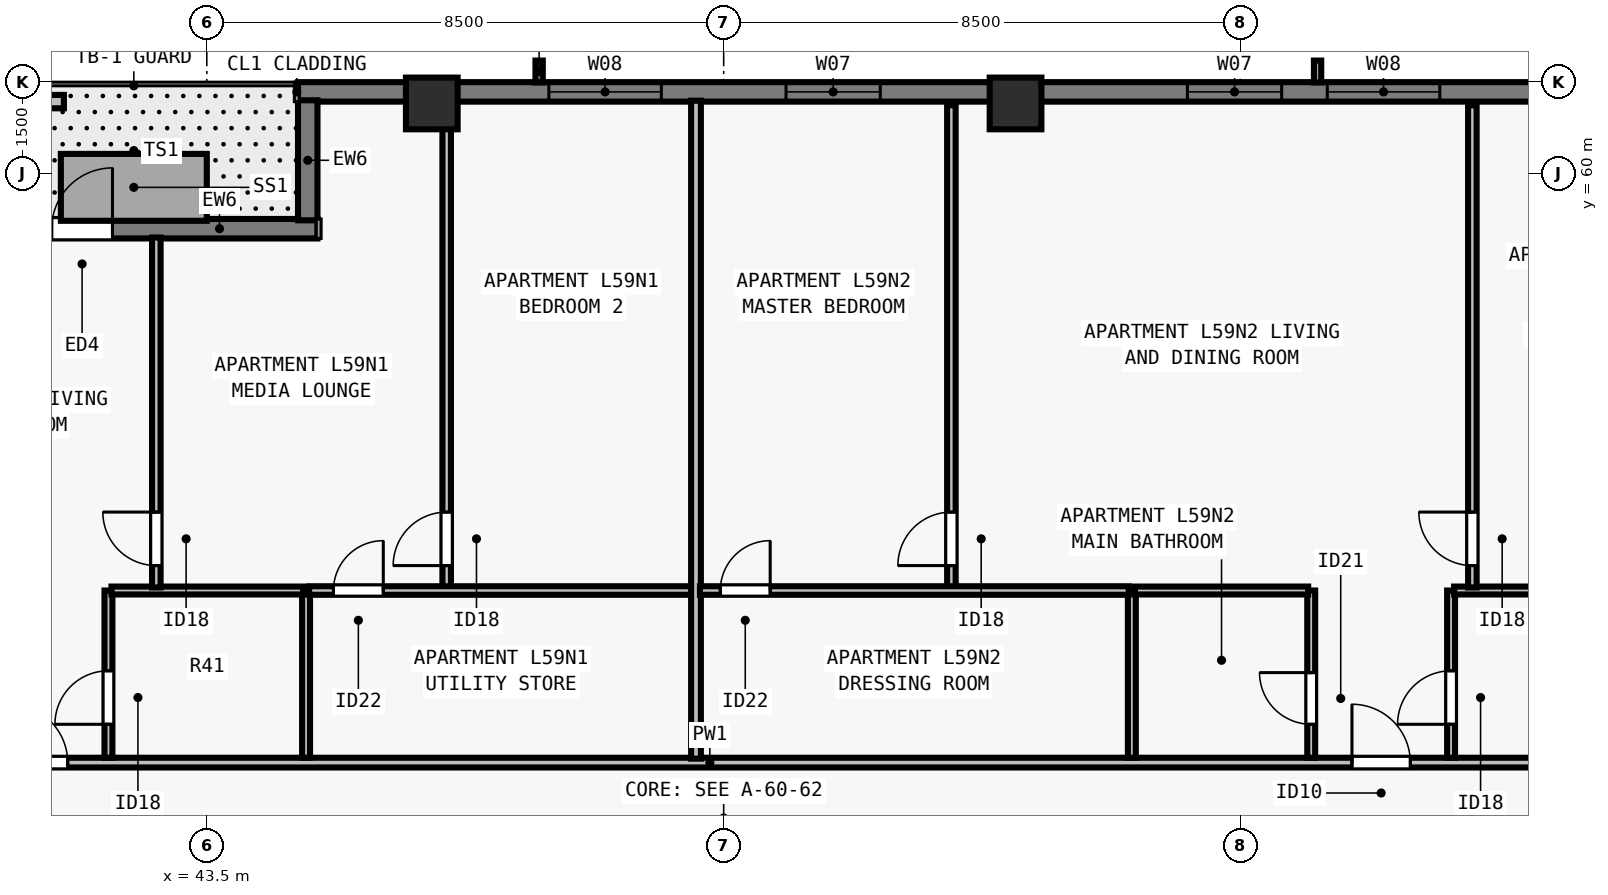
"""IFC4 building model, lengths in metres.
Left out: names, types, materials, properties, quantities, classifications, styles, units other than length and angle.
Written with IfcOpenShell. Run it as: python <this file> out.ifc"""

import sys

from ifc_helpers import new_model, si_unit, direction, frame, frame_2d, origin, origin_2d, place, context, subcontext, project, spatial, rectangle, extrude, element, fill, save


model = new_model("IFC4")
c1 = context("Model", 3, precision=1e-05, world=origin(), true_north=direction((0.0, 1.0)))
c2 = subcontext(c1, "Body", "Model", "MODEL_VIEW")
j1 = project(units=[si_unit("LENGTHUNIT", "METRE"), si_unit("PLANEANGLEUNIT", "RADIAN")], contexts=[c1])
p1 = place(None, origin())
s1 = spatial("IfcSite", under=j1, at=p1, CompositionType="ELEMENT")
p2 = place(p1, origin())
s2 = spatial("IfcBuilding", under=s1, at=p2, CompositionType="ELEMENT")
p3 = place(p2, frame((0.0, 0.0, 216.5)))
s3 = spatial("IfcBuildingStorey", under=s2, at=p3, CompositionType="ELEMENT", Elevation=216.5)
for number, where, z_axis, x_axis in (
    (1, (56.8, 61.15, 0.0), (0.0, 0.0, 1.0), (1.0, 0.0, 0.0)),
    (2, (47.2, 61.15, 0.0), (0.0, 0.0, 1.0), (1.0, 0.0, 0.0)),
):
    element("IfcColumn", number, at=place(p3, frame(where, z_axis=z_axis, x_axis=x_axis)), inside=s3, PredefinedType="COLUMN", context=c2, shape_type="SweptSolid", body=[
        extrude(rectangle(XDim=0.85, YDim=0.85, at=origin_2d()), origin(), (0.0, 0.0, 1.0), 3.5),
    ])
p4 = place(p3, frame((45.0, 61.34, 0.0), z_axis=(0.0, 0.0, 1.0), x_axis=(1.0, 0.0, 0.0)))
e3 = element("IfcWall", 3, at=p4, inside=s3, PredefinedType="SOLIDWALL", context=c2, shape_type="SweptSolid", body=[
    extrude(rectangle(XDim=24.202, YDim=0.32, at=frame_2d((12.101, 0.0))), origin(), (0.0, 0.0, 1.0), 3.29),
])
p5 = place(p4, frame((4.125, 0.0, 0.8)))
e4 = element("IfcOpeningElement", 4, at=p5, cuts=e3, PredefinedType="OPENING", context=c2, shape_type="SweptSolid", body=[
    extrude(rectangle(XDim=1.85, YDim=1.678, at=frame_2d((0.925, 0.839))), frame((0.0, 0.17, 0.0), z_axis=(0.0, -1.0, 0.0), x_axis=(1.0, 0.0, 0.0)), (0.0, 0.0, 1.0), 0.34),
])
p6 = place(p4, frame((8.026, 0.0, 0.8)))
e5 = element("IfcOpeningElement", 5, at=p6, cuts=e3, PredefinedType="OPENING", context=c2, shape_type="SweptSolid", body=[
    extrude(rectangle(XDim=1.55, YDim=1.678, at=frame_2d((0.775, 0.839))), frame((0.0, 0.17, 0.0), z_axis=(0.0, -1.0, 0.0), x_axis=(1.0, 0.0, 0.0)), (0.0, 0.0, 1.0), 0.34),
])
p7 = place(p4, frame((14.626, 0.0, 0.8)))
e6 = element("IfcOpeningElement", 6, at=p7, cuts=e3, PredefinedType="OPENING", context=c2, shape_type="SweptSolid", body=[
    extrude(rectangle(XDim=1.55, YDim=1.678, at=frame_2d((0.775, 0.839))), frame((0.0, 0.17, 0.0), z_axis=(0.0, -1.0, 0.0), x_axis=(1.0, 0.0, 0.0)), (0.0, 0.0, 1.0), 0.34),
])
p8 = place(p4, frame((16.927, 0.0, 0.8)))
e7 = element("IfcOpeningElement", 7, at=p8, cuts=e3, PredefinedType="OPENING", context=c2, shape_type="SweptSolid", body=[
    extrude(rectangle(XDim=1.85, YDim=1.678, at=frame_2d((0.925, 0.839))), frame((0.0, 0.17, 0.0), z_axis=(0.0, -1.0, 0.0), x_axis=(1.0, 0.0, 0.0)), (0.0, 0.0, 1.0), 0.34),
])
p9 = place(p3, frame((39.578, 59.09, 0.0), z_axis=(0.0, 0.0, 1.0), x_axis=(1.0, 0.0, 0.0)))
e8 = element("IfcWall", 8, at=p9, inside=s3, PredefinedType="SOLIDWALL", context=c2, shape_type="SweptSolid", body=[
    extrude(rectangle(XDim=5.742, YDim=0.32, at=frame_2d((2.871, 0.0))), origin(), (0.0, 0.0, 1.0), 3.29),
])
p10 = place(p9, frame((1.371, 0.0, 0.0)))
e9 = element("IfcOpeningElement", 9, at=p10, cuts=e8, PredefinedType="OPENING", context=c2, shape_type="SweptSolid", body=[
    extrude(rectangle(XDim=1.0, YDim=2.15, at=frame_2d((0.5, 1.075))), frame((0.0, 0.17, 0.0), z_axis=(0.0, -1.0, 0.0), x_axis=(1.0, 0.0, 0.0)), (0.0, 0.0, 1.0), 0.34),
])
p11 = place(p3, frame((45.16, 59.228, 0.0), z_axis=(0.0, 0.0, 1.0), x_axis=(0.0, 1.0, 0.0)))
e10 = element("IfcWall", 10, at=p11, inside=s3, PredefinedType="SOLIDWALL", context=c2, shape_type="SweptSolid", body=[
    extrude(rectangle(XDim=1.974, YDim=0.32, at=frame_2d((0.987, 0.0))), origin(), (0.0, 0.0, 1.0), 3.29),
])
p12 = place(p3, frame((39.85, 61.18, 0.0), z_axis=(0.0, 0.0, 1.0), x_axis=(1.0, 0.0, 0.0)))
e11 = element("IfcWall", 11, at=p12, inside=s3, PredefinedType="PARAPET", context=c2, shape_type="SweptSolid", body=[
    extrude(rectangle(XDim=1.3, YDim=0.22, at=frame_2d((0.65, 0.0))), origin(), (0.0, 0.0, 1.0), 0.55),
])
p13 = place(p3, frame((29.805, 50.31, 0.0), z_axis=(0.0, 0.0, 1.0), x_axis=(1.0, 0.0, 0.0)))
e12 = element("IfcWall", 12, at=p13, inside=s3, PredefinedType="PARTITIONING", context=c2, shape_type="SweptSolid", body=[
    extrude(rectangle(XDim=44.39, YDim=0.16, at=frame_2d((22.195, 0.0))), origin(), (0.0, 0.0, 1.0), 2.958),
])
p14 = place(p13, frame((10.448, 0.0, 0.0)))
e13 = element("IfcOpeningElement", 13, at=p14, cuts=e12, PredefinedType="OPENING", context=c2, shape_type="SweptSolid", body=[
    extrude(rectangle(XDim=0.96, YDim=2.18, at=frame_2d((0.48, 1.09))), frame((0.0, 0.09, 0.0), z_axis=(0.0, -1.0, 0.0), x_axis=(1.0, 0.0, 0.0)), (0.0, 0.0, 1.0), 0.18),
])
p15 = place(p13, frame((32.528, 0.0, 0.0)))
e14 = element("IfcOpeningElement", 14, at=p15, cuts=e12, PredefinedType="OPENING", context=c2, shape_type="SweptSolid", body=[
    extrude(rectangle(XDim=0.96, YDim=2.18, at=frame_2d((0.48, 1.09))), frame((0.0, 0.09, 0.0), z_axis=(0.0, -1.0, 0.0), x_axis=(1.0, 0.0, 0.0)), (0.0, 0.0, 1.0), 0.18),
])
p16 = place(p3, frame((45.133, 50.39, 0.0), z_axis=(0.0, 0.0, 1.0), x_axis=(0.0, 1.0, 0.0)))
e15 = element("IfcWall", 15, at=p16, inside=s3, PredefinedType="PLUMBINGWALL", context=c2, shape_type="SweptSolid", body=[
    extrude(rectangle(XDim=2.75, YDim=0.13, at=frame_2d((1.375, 0.0))), origin(), (0.0, 0.0, 1.0), 3.29),
])
p17 = place(p3, frame((41.883, 50.39, 0.0), z_axis=(0.0, 0.0, 1.0), x_axis=(0.0, 1.0, 0.0)))
e16 = element("IfcWall", 16, at=p17, inside=s3, PredefinedType="PLUMBINGWALL", context=c2, shape_type="SweptSolid", body=[
    extrude(rectangle(XDim=2.75, YDim=0.13, at=frame_2d((1.375, 0.0))), origin(), (0.0, 0.0, 1.0), 3.29),
])
p18 = place(p17, frame((0.55, 0.0, 0.0)))
e17 = element("IfcOpeningElement", 17, at=p18, cuts=e16, PredefinedType="OPENING", context=c2, shape_type="SweptSolid", body=[
    extrude(rectangle(XDim=0.88, YDim=2.1, at=frame_2d((0.44, 1.05))), frame((0.0, 0.075, 0.0), z_axis=(0.0, -1.0, 0.0), x_axis=(1.0, 0.0, 0.0)), (0.0, 0.0, 1.0), 0.15),
])
p19 = place(p3, frame((41.933, 53.14, 0.0), z_axis=(0.0, 0.0, 1.0), x_axis=(1.0, 0.0, 0.0)))
e18 = element("IfcWall", 18, at=p19, inside=s3, PredefinedType="PLUMBINGWALL", context=c2, shape_type="SweptSolid", body=[
    extrude(rectangle(XDim=3.15, YDim=0.13, at=frame_2d((1.575, 0.0))), origin(), (0.0, 0.0, 1.0), 3.29),
])
p20 = place(p3, frame((47.445, 53.1, 0.0), z_axis=(0.0, 0.0, 1.0), x_axis=(0.0, 1.0, 0.0)))
e19 = element("IfcWall", 19, at=p20, inside=s3, PredefinedType="PARTITIONING", context=c2, shape_type="SweptSolid", body=[
    extrude(rectangle(XDim=8.02, YDim=0.14, at=frame_2d((4.01, 0.0))), origin(), (0.0, 0.0, 1.0), 3.29),
])
p21 = place(p20, frame((0.45, 0.0, 0.0)))
e20 = element("IfcOpeningElement", 20, at=p21, cuts=e19, PredefinedType="OPENING", context=c2, shape_type="SweptSolid", body=[
    extrude(rectangle(XDim=0.88, YDim=2.1, at=frame_2d((0.44, 1.05))), frame((0.0, 0.08, 0.0), z_axis=(0.0, -1.0, 0.0), x_axis=(1.0, 0.0, 0.0)), (0.0, 0.0, 1.0), 0.16),
])
p22 = place(p3, frame((45.183, 53.14, 0.0), z_axis=(0.0, 0.0, 1.0), x_axis=(1.0, 0.0, 0.0)))
e21 = element("IfcWall", 21, at=p22, inside=s3, PredefinedType="PARTITIONING", context=c2, shape_type="SweptSolid", body=[
    extrude(rectangle(XDim=6.412, YDim=0.14, at=frame_2d((3.206, 0.0))), origin(), (0.0, 0.0, 1.0), 3.29),
])
p23 = place(p22, frame((0.4, 0.0, 0.0)))
e22 = element("IfcOpeningElement", 22, at=p23, cuts=e21, PredefinedType="OPENING", context=c2, shape_type="SweptSolid", body=[
    extrude(rectangle(XDim=0.82, YDim=2.1, at=frame_2d((0.41, 1.05))), frame((0.0, 0.08, 0.0), z_axis=(0.0, -1.0, 0.0), x_axis=(1.0, 0.0, 0.0)), (0.0, 0.0, 1.0), 0.16),
])
p24 = place(p3, frame((42.67, 53.19, 0.0), z_axis=(0.0, 0.0, 1.0), x_axis=(0.0, 1.0, 0.0)))
e23 = element("IfcWall", 23, at=p24, inside=s3, PredefinedType="PARTITIONING", context=c2, shape_type="SweptSolid", body=[
    extrude(rectangle(XDim=5.755, YDim=0.14, at=frame_2d((2.877, 0.0))), origin(), (0.0, 0.0, 1.0), 3.29),
])
p25 = place(p24, frame((0.36, 0.0, 0.0)))
e24 = element("IfcOpeningElement", 24, at=p25, cuts=e23, PredefinedType="OPENING", context=c2, shape_type="SweptSolid", body=[
    extrude(rectangle(XDim=0.88, YDim=2.1, at=frame_2d((0.44, 1.05))), frame((0.0, 0.08, 0.0), z_axis=(0.0, -1.0, 0.0), x_axis=(1.0, 0.0, 0.0)), (0.0, 0.0, 1.0), 0.16),
])
p26 = place(p3, frame((51.545, 50.375, 0.0), z_axis=(0.0, 0.0, 1.0), x_axis=(0.0, 1.0, 0.0)))
e25 = element("IfcWall", 25, at=p26, inside=s3, PredefinedType="PARTITIONING", context=c2, shape_type="SweptSolid", body=[
    extrude(rectangle(XDim=10.82, YDim=0.16, at=frame_2d((5.41, 0.0))), origin(), (0.0, 0.0, 1.0), 2.958),
])
p27 = place(p3, frame((58.712, 50.39, 0.0), z_axis=(0.0, 0.0, 1.0), x_axis=(0.0, 1.0, 0.0)))
e26 = element("IfcWall", 26, at=p27, inside=s3, PredefinedType="PLUMBINGWALL", context=c2, shape_type="SweptSolid", body=[
    extrude(rectangle(XDim=2.75, YDim=0.13, at=frame_2d((1.375, 0.0))), origin(), (0.0, 0.0, 1.0), 3.29),
])
p28 = place(p3, frame((61.663, 50.39, 0.0), z_axis=(0.0, 0.0, 1.0), x_axis=(0.0, 1.0, 0.0)))
e27 = element("IfcWall", 27, at=p28, inside=s3, PredefinedType="PLUMBINGWALL", context=c2, shape_type="SweptSolid", body=[
    extrude(rectangle(XDim=2.75, YDim=0.13, at=frame_2d((1.375, 0.0))), origin(), (0.0, 0.0, 1.0), 3.29),
])
p29 = place(p28, frame((0.55, 0.0, 0.0)))
e28 = element("IfcOpeningElement", 28, at=p29, cuts=e27, PredefinedType="OPENING", context=c2, shape_type="SweptSolid", body=[
    extrude(rectangle(XDim=0.85, YDim=2.08, at=frame_2d((0.425, 1.04))), frame((0.0, 0.075, 0.0), z_axis=(0.0, -1.0, 0.0), x_axis=(1.0, 0.0, 0.0)), (0.0, 0.0, 1.0), 0.15),
])
p30 = place(p3, frame((58.762, 53.14, 0.0), z_axis=(0.0, 0.0, 1.0), x_axis=(1.0, 0.0, 0.0)))
e29 = element("IfcWall", 29, at=p30, inside=s3, PredefinedType="PLUMBINGWALL", context=c2, shape_type="SweptSolid", body=[
    extrude(rectangle(XDim=2.85, YDim=0.13, at=frame_2d((1.425, 0.0))), origin(), (0.0, 0.0, 1.0), 3.29),
])
p31 = place(p3, frame((63.962, 50.39, 0.0), z_axis=(0.0, 0.0, 1.0), x_axis=(0.0, 1.0, 0.0)))
e30 = element("IfcWall", 30, at=p31, inside=s3, PredefinedType="PLUMBINGWALL", context=c2, shape_type="SweptSolid", body=[
    extrude(rectangle(XDim=2.75, YDim=0.13, at=frame_2d((1.375, 0.0))), origin(), (0.0, 0.0, 1.0), 2.573),
])
p32 = place(p31, frame((0.55, 0.0, 0.0)))
e31 = element("IfcOpeningElement", 31, at=p32, cuts=e30, PredefinedType="OPENING", context=c2, shape_type="SweptSolid", body=[
    extrude(rectangle(XDim=0.88, YDim=2.1, at=frame_2d((0.44, 1.05))), frame((0.0, 0.075, 0.0), z_axis=(0.0, -1.0, 0.0), x_axis=(1.0, 0.0, 0.0)), (0.0, 0.0, 1.0), 0.15),
])
p33 = place(p3, frame((64.012, 53.14, 0.0), z_axis=(0.0, 0.0, 1.0), x_axis=(1.0, 0.0, 0.0)))
e32 = element("IfcWall", 32, at=p33, inside=s3, PredefinedType="PLUMBINGWALL", context=c2, shape_type="SweptSolid", body=[
    extrude(rectangle(XDim=3.15, YDim=0.13, at=frame_2d((1.575, 0.0))), origin(), (0.0, 0.0, 1.0), 3.29),
])
p34 = place(p3, frame((55.745, 53.1, 0.0), z_axis=(0.0, 0.0, 1.0), x_axis=(0.0, 1.0, 0.0)))
e33 = element("IfcWall", 33, at=p34, inside=s3, PredefinedType="PARTITIONING", context=c2, shape_type="SweptSolid", body=[
    extrude(rectangle(XDim=8.02, YDim=0.14, at=frame_2d((4.01, 0.0))), origin(), (0.0, 0.0, 1.0), 2.958),
])
p35 = place(p34, frame((0.45, 0.0, 0.0)))
e34 = element("IfcOpeningElement", 34, at=p35, cuts=e33, PredefinedType="OPENING", context=c2, shape_type="SweptSolid", body=[
    extrude(rectangle(XDim=0.88, YDim=2.1, at=frame_2d((0.44, 1.05))), frame((0.0, 0.08, 0.0), z_axis=(0.0, -1.0, 0.0), x_axis=(1.0, 0.0, 0.0)), (0.0, 0.0, 1.0), 0.16),
])
p36 = place(p3, frame((51.61, 53.14, 0.0), z_axis=(0.0, 0.0, 1.0), x_axis=(1.0, 0.0, 0.0)))
e35 = element("IfcWall", 35, at=p36, inside=s3, PredefinedType="PARTITIONING", context=c2, shape_type="SweptSolid", body=[
    extrude(rectangle(XDim=7.052, YDim=0.14, at=frame_2d((3.526, 0.0))), origin(), (0.0, 0.0, 1.0), 3.29),
])
p37 = place(p36, frame((0.335, 0.0, 0.0)))
e36 = element("IfcOpeningElement", 36, at=p37, cuts=e35, PredefinedType="OPENING", context=c2, shape_type="SweptSolid", body=[
    extrude(rectangle(XDim=0.82, YDim=2.1, at=frame_2d((0.41, 1.05))), frame((0.0, 0.08, 0.0), z_axis=(0.0, -1.0, 0.0), x_axis=(1.0, 0.0, 0.0)), (0.0, 0.0, 1.0), 0.16),
])
p38 = place(p3, frame((64.312, 53.19, 0.0), z_axis=(0.0, 0.0, 1.0), x_axis=(0.0, 1.0, 0.0)))
e37 = element("IfcWall", 37, at=p38, inside=s3, PredefinedType="PARTITIONING", context=c2, shape_type="SweptSolid", body=[
    extrude(rectangle(XDim=7.93, YDim=0.14, at=frame_2d((3.965, 0.0))), origin(), (0.0, 0.0, 1.0), 2.573),
])
p39 = place(p38, frame((0.36, 0.0, 0.0)))
e38 = element("IfcOpeningElement", 38, at=p39, cuts=e37, PredefinedType="OPENING", context=c2, shape_type="SweptSolid", body=[
    extrude(rectangle(XDim=0.88, YDim=2.1, at=frame_2d((0.44, 1.05))), frame((0.0, 0.08, 0.0), z_axis=(0.0, -1.0, 0.0), x_axis=(1.0, 0.0, 0.0)), (0.0, 0.0, 1.0), 0.16),
])
p40 = place(p5, origin())
e39 = element("IfcWindow", 39, at=p40, inside=s3, PartitioningType="SINGLE_PANEL", PredefinedType="WINDOW", context=c2, shape_type="SweptSolid", body=[
    extrude(rectangle(XDim=1.85, YDim=1.678, at=frame_2d((0.925, 0.839))), frame((0.0, -0.05, 0.0), z_axis=(0.0, -1.0, 0.0), x_axis=(1.0, 0.0, 0.0)), (0.0, 0.0, 1.0), 0.06),
])
fill(e4, e39)
p41 = place(p6, origin())
e40 = element("IfcWindow", 40, at=p41, inside=s3, PartitioningType="SINGLE_PANEL", PredefinedType="WINDOW", context=c2, shape_type="SweptSolid", body=[
    extrude(rectangle(XDim=1.55, YDim=1.678, at=frame_2d((0.775, 0.839))), frame((0.0, -0.05, 0.0), z_axis=(0.0, -1.0, 0.0), x_axis=(1.0, 0.0, 0.0)), (0.0, 0.0, 1.0), 0.06),
])
fill(e5, e40)
p42 = place(p7, origin())
e41 = element("IfcWindow", 41, at=p42, inside=s3, PartitioningType="SINGLE_PANEL", PredefinedType="WINDOW", context=c2, shape_type="SweptSolid", body=[
    extrude(rectangle(XDim=1.55, YDim=1.678, at=frame_2d((0.775, 0.839))), frame((0.0, -0.05, 0.0), z_axis=(0.0, -1.0, 0.0), x_axis=(1.0, 0.0, 0.0)), (0.0, 0.0, 1.0), 0.06),
])
fill(e6, e41)
p43 = place(p8, origin())
e42 = element("IfcWindow", 42, at=p43, inside=s3, PartitioningType="SINGLE_PANEL", PredefinedType="WINDOW", context=c2, shape_type="SweptSolid", body=[
    extrude(rectangle(XDim=1.85, YDim=1.678, at=frame_2d((0.925, 0.839))), frame((0.0, -0.05, 0.0), z_axis=(0.0, -1.0, 0.0), x_axis=(1.0, 0.0, 0.0)), (0.0, 0.0, 1.0), 0.06),
])
fill(e7, e42)
p44 = place(p10, origin())
e43 = element("IfcDoor", 43, at=p44, inside=s3, OperationType="SINGLE_SWING_RIGHT", PredefinedType="DOOR", context=c2, shape_type="SweptSolid", body=[
    extrude(rectangle(XDim=1.0, YDim=2.15, at=frame_2d((0.5, 1.075))), frame((0.0, 0.025, 0.0), z_axis=(0.0, -1.0, 0.0), x_axis=(1.0, 0.0, 0.0)), (0.0, 0.0, 1.0), 0.05),
])
fill(e9, e43)
p45 = place(p18, origin())
e44 = element("IfcDoor", 44, at=p45, inside=s3, OperationType="SINGLE_SWING_LEFT", PredefinedType="DOOR", context=c2, shape_type="SweptSolid", body=[
    extrude(rectangle(XDim=0.88, YDim=2.1, at=frame_2d((0.44, 1.05))), frame((0.0, 0.025, 0.0), z_axis=(0.0, -1.0, 0.0), x_axis=(1.0, 0.0, 0.0)), (0.0, 0.0, 1.0), 0.05),
])
fill(e17, e44)
p46 = place(p23, origin())
e45 = element("IfcDoor", 45, at=p46, inside=s3, OperationType="SINGLE_SWING_RIGHT", PredefinedType="DOOR", context=c2, shape_type="SweptSolid", body=[
    extrude(rectangle(XDim=0.82, YDim=2.1, at=frame_2d((0.41, 1.05))), frame((0.0, 0.025, 0.0), z_axis=(0.0, -1.0, 0.0), x_axis=(1.0, 0.0, 0.0)), (0.0, 0.0, 1.0), 0.05),
])
fill(e22, e45)
p47 = place(p21, origin())
e46 = element("IfcDoor", 46, at=p47, inside=s3, OperationType="SINGLE_SWING_LEFT", PredefinedType="DOOR", context=c2, shape_type="SweptSolid", body=[
    extrude(rectangle(XDim=0.88, YDim=2.1, at=frame_2d((0.44, 1.05))), frame((0.0, 0.025, 0.0), z_axis=(0.0, -1.0, 0.0), x_axis=(1.0, 0.0, 0.0)), (0.0, 0.0, 1.0), 0.05),
])
fill(e20, e46)
p48 = place(p25, origin())
e47 = element("IfcDoor", 47, at=p48, inside=s3, OperationType="SINGLE_SWING_RIGHT", PredefinedType="DOOR", context=c2, shape_type="SweptSolid", body=[
    extrude(rectangle(XDim=0.88, YDim=2.1, at=frame_2d((0.44, 1.05))), frame((0.0, 0.025, 0.0), z_axis=(0.0, -1.0, 0.0), x_axis=(1.0, 0.0, 0.0)), (0.0, 0.0, 1.0), 0.05),
])
fill(e24, e47)
p49 = place(p14, origin())
e48 = element("IfcDoor", 48, at=p49, inside=s3, OperationType="SINGLE_SWING_LEFT", PredefinedType="DOOR", context=c2, shape_type="SweptSolid", body=[
    extrude(rectangle(XDim=0.96, YDim=2.18, at=frame_2d((0.48, 1.09))), frame((0.0, 0.025, 0.0), z_axis=(0.0, -1.0, 0.0), x_axis=(1.0, 0.0, 0.0)), (0.0, 0.0, 1.0), 0.05),
])
fill(e13, e48)
p50 = place(p29, origin())
e49 = element("IfcDoor", 49, at=p50, inside=s3, OperationType="SINGLE_SWING_RIGHT", PredefinedType="DOOR", context=c2, shape_type="SweptSolid", body=[
    extrude(rectangle(XDim=0.85, YDim=2.08, at=frame_2d((0.425, 1.04))), frame((0.0, 0.025, 0.0), z_axis=(0.0, -1.0, 0.0), x_axis=(1.0, 0.0, 0.0)), (0.0, 0.0, 1.0), 0.05),
])
fill(e28, e49)
p51 = place(p32, origin())
e50 = element("IfcDoor", 50, at=p51, inside=s3, OperationType="SINGLE_SWING_LEFT", PredefinedType="DOOR", context=c2, shape_type="SweptSolid", body=[
    extrude(rectangle(XDim=0.88, YDim=2.1, at=frame_2d((0.44, 1.05))), frame((0.0, 0.025, 0.0), z_axis=(0.0, -1.0, 0.0), x_axis=(1.0, 0.0, 0.0)), (0.0, 0.0, 1.0), 0.05),
])
fill(e31, e50)
p52 = place(p37, origin())
e51 = element("IfcDoor", 51, at=p52, inside=s3, OperationType="SINGLE_SWING_RIGHT", PredefinedType="DOOR", context=c2, shape_type="SweptSolid", body=[
    extrude(rectangle(XDim=0.82, YDim=2.1, at=frame_2d((0.41, 1.05))), frame((0.0, 0.025, 0.0), z_axis=(0.0, -1.0, 0.0), x_axis=(1.0, 0.0, 0.0)), (0.0, 0.0, 1.0), 0.05),
])
fill(e36, e51)
p53 = place(p35, origin())
e52 = element("IfcDoor", 52, at=p53, inside=s3, OperationType="SINGLE_SWING_LEFT", PredefinedType="DOOR", context=c2, shape_type="SweptSolid", body=[
    extrude(rectangle(XDim=0.88, YDim=2.1, at=frame_2d((0.44, 1.05))), frame((0.0, 0.025, 0.0), z_axis=(0.0, -1.0, 0.0), x_axis=(1.0, 0.0, 0.0)), (0.0, 0.0, 1.0), 0.05),
])
fill(e34, e52)
p54 = place(p39, origin())
e53 = element("IfcDoor", 53, at=p54, inside=s3, OperationType="SINGLE_SWING_RIGHT", PredefinedType="DOOR", context=c2, shape_type="SweptSolid", body=[
    extrude(rectangle(XDim=0.88, YDim=2.1, at=frame_2d((0.44, 1.05))), frame((0.0, 0.025, 0.0), z_axis=(0.0, -1.0, 0.0), x_axis=(1.0, 0.0, 0.0)), (0.0, 0.0, 1.0), 0.05),
])
fill(e38, e53)
p55 = place(p15, origin())
e54 = element("IfcDoor", 54, at=p55, inside=s3, OperationType="SINGLE_SWING_LEFT", PredefinedType="DOOR", context=c2, shape_type="SweptSolid", body=[
    extrude(rectangle(XDim=0.96, YDim=2.18, at=frame_2d((0.48, 1.09))), frame((0.0, 0.025, 0.0), z_axis=(0.0, -1.0, 0.0), x_axis=(1.0, 0.0, 0.0)), (0.0, 0.0, 1.0), 0.05),
])
fill(e14, e54)
save(model, sys.argv[1])
